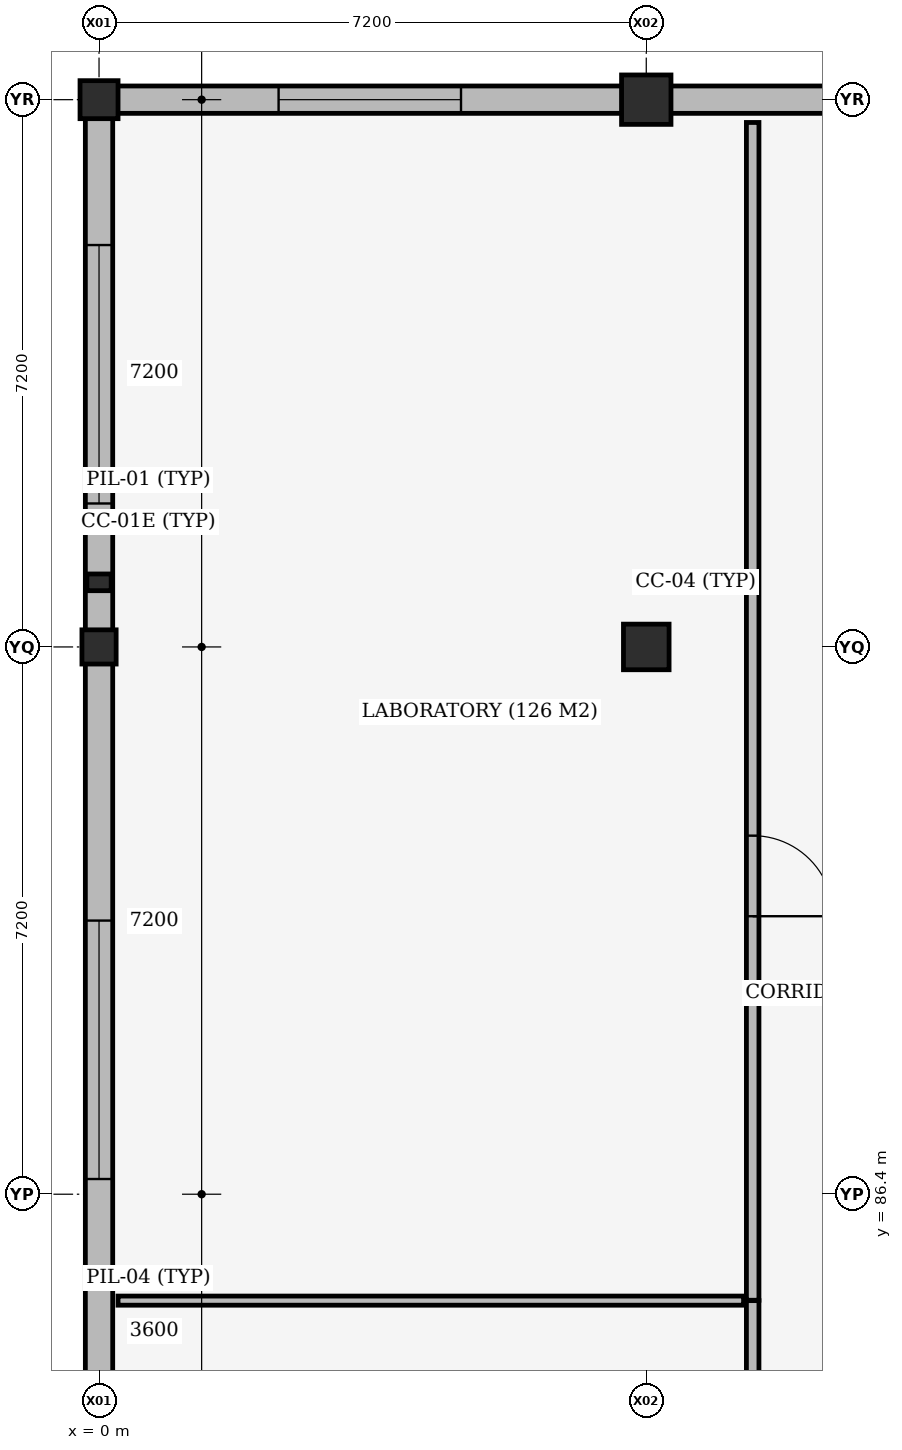
"""IFC4 building model, lengths in metres.
Left out: names, types, materials, properties, quantities, classifications, styles, units other than length and angle.
Written with IfcOpenShell. Run it as: python <this file> out.ifc"""

import sys

from ifc_helpers import new_model, si_unit, direction, frame, frame_2d, origin, origin_2d, place, context, subcontext, project, spatial, rectangle, extrude, element, fill, save


model = new_model("IFC4")
c1 = context("Model", 3, precision=1e-05, world=origin(), true_north=direction((0.0, 1.0)))
c2 = subcontext(c1, "Body", "Model", "MODEL_VIEW")
j1 = project(units=[si_unit("LENGTHUNIT", "METRE"), si_unit("PLANEANGLEUNIT", "RADIAN")], contexts=[c1])
p1 = place(None, origin())
s1 = spatial("IfcSite", under=j1, at=p1, CompositionType="ELEMENT")
p2 = place(p1, origin())
s2 = spatial("IfcBuilding", under=s1, at=p2, CompositionType="ELEMENT")
p3 = place(p2, frame((0.0, 0.0, 5.4)))
s3 = spatial("IfcBuildingStorey", under=s2, at=p3, CompositionType="ELEMENT", Elevation=5.4)
p4 = place(p3, frame((0.0, 93.6, 0.0), z_axis=(0.0, 0.0, 1.0), x_axis=(1.0, 0.0, 0.0)))
e1 = element("IfcColumn", 1, at=p4, inside=s3, PredefinedType="COLUMN", context=c2, shape_type="SweptSolid", body=[
    extrude(rectangle(XDim=0.45, YDim=0.45, at=origin_2d()), origin(), (0.0, 0.0, 1.0), 3.89),
])
p5 = place(p3, frame((0.0, 100.8, 0.0), z_axis=(0.0, 0.0, 1.0), x_axis=(1.0, 0.0, 0.0)))
e2 = element("IfcColumn", 2, at=p5, inside=s3, PredefinedType="COLUMN", context=c2, shape_type="SweptSolid", body=[
    extrude(rectangle(XDim=0.5, YDim=0.5, at=origin_2d()), origin(), (0.0, 0.0, 1.0), 3.89),
])
p6 = place(p3, frame((7.2, 93.6, 0.0), z_axis=(0.0, 0.0, 1.0), x_axis=(1.0, 0.0, 0.0)))
e3 = element("IfcColumn", 3, at=p6, inside=s3, PredefinedType="COLUMN", context=c2, shape_type="SweptSolid", body=[
    extrude(rectangle(XDim=0.6, YDim=0.6, at=origin_2d()), origin(), (0.0, 0.0, 1.0), 3.89),
])
p7 = place(p3, frame((7.2, 100.8, 0.0), z_axis=(0.0, 0.0, 1.0), x_axis=(1.0, 0.0, 0.0)))
e4 = element("IfcColumn", 4, at=p7, inside=s3, PredefinedType="COLUMN", context=c2, shape_type="SweptSolid", body=[
    extrude(rectangle(XDim=0.65, YDim=0.65, at=origin_2d()), origin(), (0.0, 0.0, 1.0), 3.89),
])
p8 = place(p3, frame((0.0, 94.45, 0.0), z_axis=(0.0, 0.0, 1.0), x_axis=(1.0, 0.0, 0.0)))
e5 = element("IfcColumn", 5, at=p8, inside=s3, PredefinedType="PILASTER", context=c2, shape_type="SweptSolid", body=[
    extrude(rectangle(XDim=0.32, YDim=0.22, at=origin_2d()), origin(), (0.0, 0.0, 1.0), 3.89),
])
p9 = place(p3, frame((0.242, 100.8, 0.0), z_axis=(0.0, 0.0, 1.0), x_axis=(1.0, 0.0, 0.0)))
e6 = element("IfcWall", 6, at=p9, inside=s3, PredefinedType="STANDARD", context=c2, shape_type="SweptSolid", body=[
    extrude(rectangle(XDim=6.641, YDim=0.36, at=frame_2d((3.321, 0.0))), origin(), (0.0, 0.0, 1.0), 3.37),
])
p10 = place(p9, frame((2.121, 0.0, 0.9)))
e7 = element("IfcOpeningElement", 7, at=p10, cuts=e6, PredefinedType="OPENING", context=c2, shape_type="SweptSolid", body=[
    extrude(rectangle(XDim=2.4, YDim=2.2, at=frame_2d((1.2, 1.1))), frame((0.0, 0.19, 0.0), z_axis=(0.0, -1.0, 0.0), x_axis=(1.0, 0.0, 0.0)), (0.0, 0.0, 1.0), 0.38),
])
p11 = place(p3, frame((7.517, 100.8, 0.0), z_axis=(0.0, 0.0, 1.0), x_axis=(1.0, 0.0, 0.0)))
e8 = element("IfcWall", 8, at=p11, inside=s3, PredefinedType="STANDARD", context=c2, shape_type="SweptSolid", body=[
    extrude(rectangle(XDim=6.491, YDim=0.36, at=frame_2d((3.246, 0.0))), origin(), (0.0, 0.0, 1.0), 3.31),
])
p12 = place(p11, frame((2.146, 0.0, 0.9)))
e9 = element("IfcOpeningElement", 9, at=p12, cuts=e8, PredefinedType="OPENING", context=c2, shape_type="SweptSolid", body=[
    extrude(rectangle(XDim=2.2, YDim=2.2, at=frame_2d((1.1, 1.1))), frame((0.0, 0.19, 0.0), z_axis=(0.0, -1.0, 0.0), x_axis=(1.0, 0.0, 0.0)), (0.0, 0.0, 1.0), 0.38),
])
p13 = place(p3, frame((0.0, 83.217, 0.0), z_axis=(0.0, 0.0, 1.0), x_axis=(0.0, 1.0, 0.0)))
e10 = element("IfcWall", 10, at=p13, inside=s3, PredefinedType="STANDARD", context=c2, shape_type="SweptSolid", body=[
    extrude(rectangle(XDim=10.166, YDim=0.36, at=frame_2d((5.083, 0.0))), origin(), (0.0, 0.0, 1.0), 3.31),
])
p14 = place(p13, frame((3.383, 0.0, 0.9)))
e11 = element("IfcOpeningElement", 11, at=p14, cuts=e10, PredefinedType="OPENING", context=c2, shape_type="SweptSolid", body=[
    extrude(rectangle(XDim=3.4, YDim=1.5, at=frame_2d((1.7, 0.75))), frame((0.0, 0.19, 0.0), z_axis=(0.0, -1.0, 0.0), x_axis=(1.0, 0.0, 0.0)), (0.0, 0.0, 1.0), 0.38),
])
p15 = place(p3, frame((0.0, 93.817, 0.0), z_axis=(0.0, 0.0, 1.0), x_axis=(0.0, 1.0, 0.0)))
e12 = element("IfcWall", 12, at=p15, inside=s3, PredefinedType="STANDARD", context=c2, shape_type="SweptSolid", body=[
    extrude(rectangle(XDim=6.741, YDim=0.36, at=frame_2d((3.371, 0.0))), origin(), (0.0, 0.0, 1.0), 3.25),
])
p16 = place(p15, frame((1.67, 0.0, 0.9)))
e13 = element("IfcOpeningElement", 13, at=p16, cuts=e12, PredefinedType="OPENING", context=c2, shape_type="SweptSolid", body=[
    extrude(rectangle(XDim=3.4, YDim=1.5, at=frame_2d((1.7, 0.75))), frame((0.0, 0.19, 0.0), z_axis=(0.0, -1.0, 0.0), x_axis=(1.0, 0.0, 0.0)), (0.0, 0.0, 1.0), 0.38),
])
p17 = place(p3, frame((8.6, 75.605, 0.0), z_axis=(0.0, 0.0, 1.0), x_axis=(0.0, 1.0, 0.0)))
e14 = element("IfcWall", 14, at=p17, inside=s3, PredefinedType="PARTITIONING", context=c2, shape_type="SweptSolid", body=[
    extrude(rectangle(XDim=9.395, YDim=0.165, at=frame_2d((4.698, 0.0))), origin(), (0.0, 0.0, 1.0), 3.15),
])
p18 = place(p17, frame((4.173, 0.0, 0.0)))
e15 = element("IfcOpeningElement", 15, at=p18, cuts=e14, PredefinedType="OPENING", context=c2, shape_type="SweptSolid", body=[
    extrude(rectangle(XDim=1.05, YDim=2.2, at=frame_2d((0.525, 1.1))), frame((0.0, 0.093, 0.0), z_axis=(0.0, -1.0, 0.0), x_axis=(1.0, 0.0, 0.0)), (0.0, 0.0, 1.0), 0.185),
])
p19 = place(p3, frame((0.25, 85.0, 0.0), z_axis=(0.0, 0.0, 1.0), x_axis=(1.0, 0.0, 0.0)))
e16 = element("IfcWall", 16, at=p19, inside=s3, PredefinedType="PARTITIONING", context=c2, shape_type="SweptSolid", body=[
    extrude(rectangle(XDim=8.23, YDim=0.12, at=frame_2d((4.115, 0.0))), origin(), (0.0, 0.0, 1.0), 3.25),
])
p20 = place(p3, frame((8.6, 85.005, 0.0), z_axis=(0.0, 0.0, 1.0), x_axis=(0.0, 1.0, 0.0)))
e17 = element("IfcWall", 17, at=p20, inside=s3, PredefinedType="PARTITIONING", context=c2, shape_type="SweptSolid", body=[
    extrude(rectangle(XDim=15.495, YDim=0.165, at=frame_2d((7.748, 0.0))), origin(), (0.0, 0.0, 1.0), 3.37),
])
p21 = place(p20, frame((5.052, 0.0, 0.0)))
e18 = element("IfcOpeningElement", 18, at=p21, cuts=e17, PredefinedType="OPENING", context=c2, shape_type="SweptSolid", body=[
    extrude(rectangle(XDim=1.06, YDim=2.2, at=frame_2d((0.53, 1.1))), frame((0.0, 0.093, 0.0), z_axis=(0.0, -1.0, 0.0), x_axis=(1.0, 0.0, 0.0)), (0.0, 0.0, 1.0), 0.185),
])
p22 = place(p10, origin())
e19 = element("IfcWindow", 19, at=p22, inside=s3, PartitioningType="DOUBLE_PANEL_VERTICAL", PredefinedType="WINDOW", context=c2, shape_type="SweptSolid", body=[
    extrude(rectangle(XDim=2.4, YDim=2.2, at=frame_2d((1.2, 1.1))), frame((0.0, 0.03, 0.0), z_axis=(0.0, -1.0, 0.0), x_axis=(1.0, 0.0, 0.0)), (0.0, 0.0, 1.0), 0.06),
])
fill(e7, e19)
p23 = place(p14, origin())
e20 = element("IfcWindow", 20, at=p23, inside=s3, PartitioningType="DOUBLE_PANEL_VERTICAL", PredefinedType="WINDOW", context=c2, shape_type="SweptSolid", body=[
    extrude(rectangle(XDim=3.4, YDim=1.5, at=frame_2d((1.7, 0.75))), frame((0.0, 0.03, 0.0), z_axis=(0.0, -1.0, 0.0), x_axis=(1.0, 0.0, 0.0)), (0.0, 0.0, 1.0), 0.06),
])
fill(e11, e20)
p24 = place(p16, origin())
e21 = element("IfcWindow", 21, at=p24, inside=s3, PartitioningType="DOUBLE_PANEL_VERTICAL", PredefinedType="WINDOW", context=c2, shape_type="SweptSolid", body=[
    extrude(rectangle(XDim=3.4, YDim=1.5, at=frame_2d((1.7, 0.75))), frame((0.0, 0.03, 0.0), z_axis=(0.0, -1.0, 0.0), x_axis=(1.0, 0.0, 0.0)), (0.0, 0.0, 1.0), 0.06),
])
fill(e13, e21)
p25 = place(p21, origin())
e22 = element("IfcDoor", 22, at=p25, inside=s3, OperationType="SINGLE_SWING_RIGHT", PredefinedType="DOOR", context=c2, shape_type="SweptSolid", body=[
    extrude(rectangle(XDim=1.06, YDim=2.2, at=frame_2d((0.53, 1.1))), frame((0.0, 0.025, 0.0), z_axis=(0.0, -1.0, 0.0), x_axis=(1.0, 0.0, 0.0)), (0.0, 0.0, 1.0), 0.05),
])
fill(e18, e22)
save(model, sys.argv[1])
